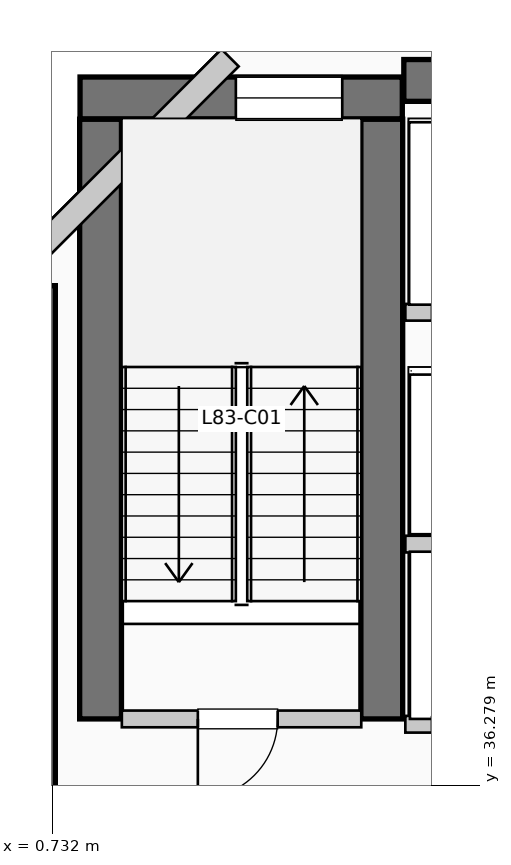
"""IFC4 building model, lengths in metres.
Left out: names, types, materials, properties, quantities, classifications, styles, units other than length and angle.
Written with IfcOpenShell. Run it as: python <this file> out.ifc"""

import sys

from ifc_helpers import new_model, si_unit, direction, frame, frame_2d, origin, place, context, subcontext, project, spatial, rectangle, extrude, element, fill, save


model = new_model("IFC4")
c1 = context("Model", 3, precision=1e-05, world=origin(), true_north=direction((0.0, 1.0)))
c2 = subcontext(c1, "Body", "Model", "MODEL_VIEW")
j1 = project(units=[si_unit("LENGTHUNIT", "METRE"), si_unit("PLANEANGLEUNIT", "RADIAN")], contexts=[c1])
p1 = place(None, origin())
s1 = spatial("IfcSite", under=j1, at=p1, CompositionType="ELEMENT")
p2 = place(p1, origin())
s2 = spatial("IfcBuilding", under=s1, at=p2, CompositionType="ELEMENT")
p3 = place(p2, frame((0.0, 0.0, 339.57)))
s3 = spatial("IfcBuildingStorey", under=s2, at=p3, CompositionType="ELEMENT", Elevation=339.57)
p4 = place(p3, frame((5.36, 45.55, 0.0), z_axis=(0.0, 0.0, 1.0), x_axis=(1.0, 0.0, 0.0)))
e1 = element("IfcWall", 1, at=p4, inside=s3, PredefinedType="SHEAR", context=c2, shape_type="SweptSolid", body=[
    extrude(rectangle(XDim=13.98, YDim=0.55, at=frame_2d((6.99, 0.0))), origin(), (0.0, 0.0, 1.0), 3.96),
])
p5 = place(p3, frame((0.5, 34.95, 0.0), z_axis=(0.0, 0.0, 1.0), x_axis=(0.0, 1.0, 0.0)))
e2 = element("IfcWall", 2, at=p5, inside=s3, PredefinedType="SHEAR", context=c2, shape_type="SweptSolid", body=[
    extrude(rectangle(XDim=7.9, YDim=0.55, at=frame_2d((3.95, 0.0))), origin(), (0.0, 0.0, 1.0), 3.96),
])
for number, where, z_axis, x_axis in (
    (3, (1.37, 37.15, 0.0), (0.0, 0.0, 1.0), (0.0, 1.0, 0.0)),
    (4, (5.07, 37.15, 0.0), (0.0, 0.0, 1.0), (0.0, 1.0, 0.0)),
):
    element("IfcWall", number, at=place(p3, frame(where, z_axis=z_axis, x_axis=x_axis)), inside=s3, PredefinedType="SHEAR", context=c2, shape_type="SweptSolid", body=[
        extrude(rectangle(XDim=7.89, YDim=0.55, at=frame_2d((3.945, 0.0))), origin(), (0.0, 0.0, 1.0), 3.96),
    ])
p6 = place(p3, frame((1.1, 45.32, 0.0), z_axis=(0.0, 0.0, 1.0), x_axis=(1.0, 0.0, 0.0)))
e5 = element("IfcWall", 5, at=p6, inside=s3, PredefinedType="SHEAR", context=c2, shape_type="SweptSolid", body=[
    extrude(rectangle(XDim=4.24, YDim=0.55, at=frame_2d((2.12, 0.0))), origin(), (0.0, 0.0, 1.0), 3.96),
])
p7 = place(p6, frame((2.05, 0.0, 1.05)))
e6 = element("IfcOpeningElement", 6, at=p7, cuts=e5, PredefinedType="OPENING", context=c2, shape_type="SweptSolid", body=[
    extrude(rectangle(XDim=1.4, YDim=1.8, at=frame_2d((0.7, 0.9))), frame((0.0, 0.285, 0.0), z_axis=(0.0, -1.0, 0.0), x_axis=(1.0, 0.0, 0.0)), (0.0, 0.0, 1.0), 0.57),
])
p8 = place(p3, frame((3.074, 45.848, 0.0), z_axis=(0.0, 0.0, 1.0), x_axis=(-0.707106781187, -0.707106781187, 0.0)))
e7 = element("IfcWall", 7, at=p8, inside=s3, PredefinedType="SOLIDWALL", context=c2, shape_type="SweptSolid", body=[
    extrude(rectangle(XDim=4.133, YDim=0.32, at=frame_2d((2.066, 0.0))), origin(), (0.0, 0.0, 1.0), 3.74),
])
p9 = place(p3, frame((1.65, 37.15, 0.0), z_axis=(0.0, 0.0, 1.0), x_axis=(1.0, 0.0, 0.0)))
e8 = element("IfcWall", 8, at=p9, inside=s3, PredefinedType="PARTITIONING", context=c2, shape_type="SweptSolid", body=[
    extrude(rectangle(XDim=3.15, YDim=0.22, at=frame_2d((1.575, 0.0))), origin(), (0.0, 0.0, 1.0), 3.74),
])
p10 = place(p9, frame((2.05, 0.0, 0.0), z_axis=(0.0, 0.0, 1.0), x_axis=(-1.0, 0.0, 0.0)))
e9 = element("IfcOpeningElement", 9, at=p10, cuts=e8, PredefinedType="OPENING", context=c2, shape_type="SweptSolid", body=[
    extrude(rectangle(XDim=1.05, YDim=2.15, at=frame_2d((0.525, 1.075))), frame((0.0, 0.12, 0.0), z_axis=(0.0, -1.0, 0.0), x_axis=(1.0, 0.0, 0.0)), (0.0, 0.0, 1.0), 0.24),
])
p11 = place(p3, frame((5.38, 37.08, 0.0), z_axis=(0.0, 0.0, 1.0), x_axis=(1.0, 0.0, 0.0)))
e10 = element("IfcWall", 10, at=p11, inside=s3, PredefinedType="PARTITIONING", context=c2, shape_type="SweptSolid", body=[
    extrude(rectangle(XDim=3.46, YDim=0.22, at=frame_2d((1.73, 0.0))), origin(), (0.0, 0.0, 1.0), 3.74),
])
p12 = place(p11, frame((1.55, 0.0, 0.0), z_axis=(0.0, 0.0, 1.0), x_axis=(-1.0, 0.0, 0.0)))
e11 = element("IfcOpeningElement", 11, at=p12, cuts=e10, PredefinedType="OPENING", context=c2, shape_type="SweptSolid", body=[
    extrude(rectangle(XDim=1.2, YDim=2.2, at=frame_2d((0.6, 1.1))), frame((0.0, 0.12, 0.0), z_axis=(0.0, -1.0, 0.0), x_axis=(1.0, 0.0, 0.0)), (0.0, 0.0, 1.0), 0.24),
])
p13 = place(p11, frame((3.22, 0.0, 0.0), z_axis=(0.0, 0.0, 1.0), x_axis=(-1.0, 0.0, 0.0)))
e12 = element("IfcOpeningElement", 12, at=p13, cuts=e10, PredefinedType="OPENING", context=c2, shape_type="SweptSolid", body=[
    extrude(rectangle(XDim=1.2, YDim=2.2, at=frame_2d((0.6, 1.1))), frame((0.0, 0.12, 0.0), z_axis=(0.0, -1.0, 0.0), x_axis=(1.0, 0.0, 0.0)), (0.0, 0.0, 1.0), 0.24),
])
p14 = place(p3, frame((5.38, 39.45, 0.0), z_axis=(0.0, 0.0, 1.0), x_axis=(1.0, 0.0, 0.0)))
e13 = element("IfcWall", 13, at=p14, inside=s3, PredefinedType="PARTITIONING", context=c2, shape_type="SweptSolid", body=[
    extrude(rectangle(XDim=3.46, YDim=0.22, at=frame_2d((1.73, 0.0))), origin(), (0.0, 0.0, 1.0), 3.74),
])
p15 = place(p3, frame((5.38, 42.5, 0.0), z_axis=(0.0, 0.0, 1.0), x_axis=(1.0, 0.0, 0.0)))
e14 = element("IfcWall", 14, at=p15, inside=s3, PredefinedType="PARTITIONING", context=c2, shape_type="SweptSolid", body=[
    extrude(rectangle(XDim=3.77, YDim=0.22, at=frame_2d((1.885, 0.0))), origin(), (0.0, 0.0, 1.0), 3.74),
])
p16 = place(p15, frame((1.75, 0.0, 0.0), z_axis=(0.0, 0.0, 1.0), x_axis=(-1.0, 0.0, 0.0)))
e15 = element("IfcOpeningElement", 15, at=p16, cuts=e14, PredefinedType="OPENING", context=c2, shape_type="SweptSolid", body=[
    extrude(rectangle(XDim=1.4, YDim=2.2, at=frame_2d((0.7, 1.1))), frame((0.0, 0.12, 0.0), z_axis=(0.0, -1.0, 0.0), x_axis=(1.0, 0.0, 0.0)), (0.0, 0.0, 1.0), 0.24),
])
p17 = place(p15, frame((3.53, 0.0, 0.0), z_axis=(0.0, 0.0, 1.0), x_axis=(-1.0, 0.0, 0.0)))
e16 = element("IfcOpeningElement", 16, at=p17, cuts=e14, PredefinedType="OPENING", context=c2, shape_type="SweptSolid", body=[
    extrude(rectangle(XDim=1.4, YDim=2.2, at=frame_2d((0.7, 1.1))), frame((0.0, 0.12, 0.0), z_axis=(0.0, -1.0, 0.0), x_axis=(1.0, 0.0, 0.0)), (0.0, 0.0, 1.0), 0.24),
])
p18 = place(p7, origin())
e17 = element("IfcWindow", 17, at=p18, inside=s3, PartitioningType="SINGLE_PANEL", PredefinedType="WINDOW", context=c2, shape_type="SweptSolid", body=[
    extrude(rectangle(XDim=1.4, YDim=1.8, at=frame_2d((0.7, 0.9))), frame((0.0, 0.03, 0.0), z_axis=(0.0, -1.0, 0.0), x_axis=(1.0, 0.0, 0.0)), (0.0, 0.0, 1.0), 0.06),
])
fill(e6, e17)
p19 = place(p10, origin())
e18 = element("IfcDoor", 18, at=p19, inside=s3, OperationType="SINGLE_SWING_LEFT", PredefinedType="DOOR", context=c2, shape_type="SweptSolid", body=[
    extrude(rectangle(XDim=1.05, YDim=2.15, at=frame_2d((0.525, 1.075))), frame((0.0, 0.025, 0.0), z_axis=(0.0, -1.0, 0.0), x_axis=(1.0, 0.0, 0.0)), (0.0, 0.0, 1.0), 0.05),
])
fill(e9, e18)
save(model, sys.argv[1])
